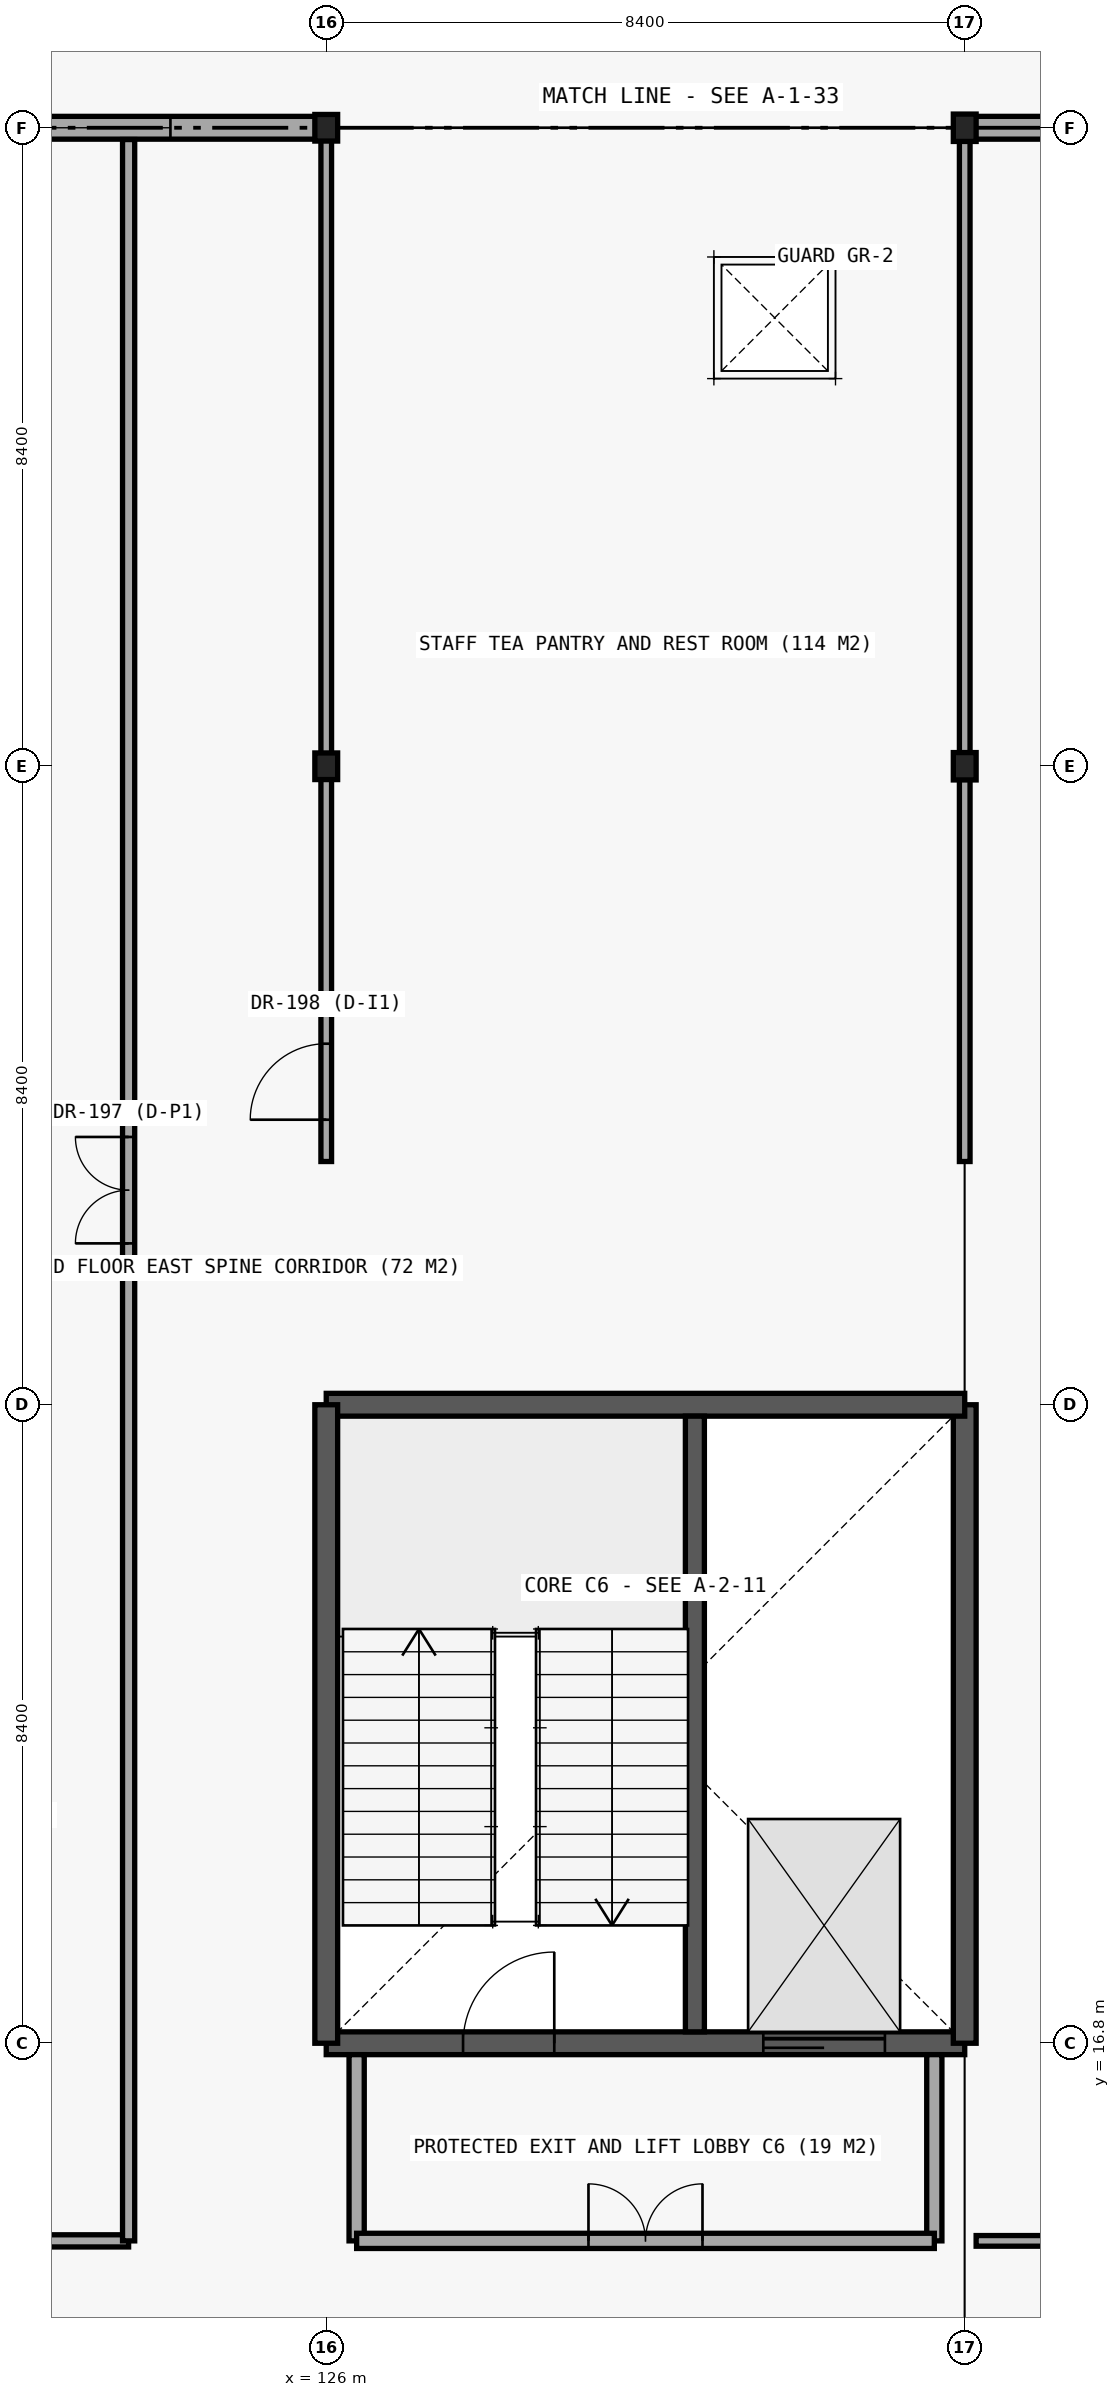
"""IFC4 building model, lengths in metres.
Left out: names, types, materials, properties, quantities, classifications, styles, units other than length and angle.
Written with IfcOpenShell. Run it as: python <this file> out.ifc"""

import sys

from ifc_helpers import new_model, si_unit, direction, frame, frame_2d, origin, origin_2d, place, context, subcontext, project, spatial, rectangle, i_section, extrude, element, fill, save


model = new_model("IFC4")
c1 = context("Model", 3, precision=1e-05, world=origin(), true_north=direction((0.0, 1.0)))
c2 = subcontext(c1, "Body", "Model", "MODEL_VIEW")
j1 = project(units=[si_unit("LENGTHUNIT", "METRE"), si_unit("PLANEANGLEUNIT", "RADIAN")], contexts=[c1])
p1 = place(None, origin())
s1 = spatial("IfcSite", under=j1, at=p1, CompositionType="ELEMENT")
p2 = place(p1, origin())
s2 = spatial("IfcBuilding", under=s1, at=p2, CompositionType="ELEMENT")
p3 = place(p2, frame((0.0, 0.0, 9.0)))
s3 = spatial("IfcBuildingStorey", under=s2, at=p3, CompositionType="ELEMENT", Elevation=9.0)
p4 = place(p3, frame((126.0, 16.8, 0.0), z_axis=(0.0, 0.0, 1.0), x_axis=(1.0, 0.0, 0.0)))
e1 = element("IfcWall", 1, at=p4, inside=s3, PredefinedType="SHEAR", context=c2, shape_type="SweptSolid", body=[
    extrude(rectangle(XDim=8.4, YDim=0.3, at=frame_2d((4.2, 0.0))), origin(), (0.0, 0.0, 1.0), 4.2),
])
p5 = place(p4, frame((1.8, 0.0, 0.0)))
e2 = element("IfcOpeningElement", 2, at=p5, cuts=e1, PredefinedType="OPENING", context=c2, shape_type="SweptSolid", body=[
    extrude(rectangle(XDim=1.2, YDim=2.2, at=frame_2d((0.6, 1.1))), frame((0.0, 0.16, 0.0), z_axis=(0.0, -1.0, 0.0), x_axis=(1.0, 0.0, 0.0)), (0.0, 0.0, 1.0), 0.32),
])
p6 = place(p4, frame((5.75, 0.0, 0.0)))
e3 = element("IfcOpeningElement", 3, at=p6, cuts=e1, PredefinedType="OPENING", context=c2, shape_type="SweptSolid", body=[
    extrude(rectangle(XDim=1.6, YDim=2.4, at=frame_2d((0.8, 1.2))), frame((0.0, 0.16, 0.0), z_axis=(0.0, -1.0, 0.0), x_axis=(1.0, 0.0, 0.0)), (0.0, 0.0, 1.0), 0.32),
])
for number, where, z_axis, x_axis in (
    (4, (134.4, 16.8, 0.0), (0.0, 0.0, 1.0), (0.0, 1.0, 0.0)),
    (5, (134.4, 25.2, 0.0), (0.0, 0.0, 1.0), (-1.0, 0.0, 0.0)),
    (6, (126.0, 25.2, 0.0), (0.0, 0.0, 1.0), (0.0, -1.0, 0.0)),
):
    element("IfcWall", number, at=place(p3, frame(where, z_axis=z_axis, x_axis=x_axis)), inside=s3, PredefinedType="SHEAR", context=c2, shape_type="SweptSolid", body=[
        extrude(rectangle(XDim=8.4, YDim=0.3, at=frame_2d((4.2, 0.0))), origin(), (0.0, 0.0, 1.0), 4.2),
    ])
p7 = place(p3, frame((130.85, 16.95, 0.0), z_axis=(0.0, 0.0, 1.0), x_axis=(0.0, 1.0, 0.0)))
e7 = element("IfcWall", 7, at=p7, inside=s3, PredefinedType="SHEAR", context=c2, shape_type="SweptSolid", body=[
    extrude(rectangle(XDim=8.1, YDim=0.25, at=frame_2d((4.05, 0.0))), origin(), (0.0, 0.0, 1.0), 4.2),
])
p8 = place(p3, frame((126.0, 33.6, 0.0), z_axis=(0.0, 0.0, 1.0), x_axis=(1.0, 0.0, 0.0)))
e8 = element("IfcColumn", 8, at=p8, inside=s3, PredefinedType="COLUMN", context=c2, shape_type="SweptSolid", body=[
    extrude(i_section(OverallWidth=0.3, OverallDepth=0.35, WebThickness=0.01, FlangeThickness=0.018, FilletRadius=0.027, at=origin_2d()), origin(), (0.0, 0.0, 1.0), 3.945),
])
p9 = place(p3, frame((126.0, 42.0, 0.0), z_axis=(0.0, 0.0, 1.0), x_axis=(1.0, 0.0, 0.0)))
e9 = element("IfcColumn", 9, at=p9, inside=s3, PredefinedType="COLUMN", context=c2, shape_type="SweptSolid", body=[
    extrude(i_section(OverallWidth=0.3, OverallDepth=0.35, WebThickness=0.01, FlangeThickness=0.018, FilletRadius=0.027, at=origin_2d()), origin(), (0.0, 0.0, 1.0), 4.03),
])
p10 = place(p3, frame((134.4, 33.6, 0.0), z_axis=(0.0, 0.0, 1.0), x_axis=(1.0, 0.0, 0.0)))
e10 = element("IfcColumn", 10, at=p10, inside=s3, PredefinedType="COLUMN", context=c2, shape_type="SweptSolid", body=[
    extrude(i_section(OverallWidth=0.3, OverallDepth=0.36, WebThickness=0.012, FlangeThickness=0.022, FilletRadius=0.027, at=origin_2d()), origin(), (0.0, 0.0, 1.0), 3.945),
])
p11 = place(p3, frame((134.4, 42.0, 0.0), z_axis=(0.0, 0.0, 1.0), x_axis=(1.0, 0.0, 0.0)))
e11 = element("IfcColumn", 11, at=p11, inside=s3, PredefinedType="COLUMN", context=c2, shape_type="SweptSolid", body=[
    extrude(i_section(OverallWidth=0.3, OverallDepth=0.36, WebThickness=0.012, FlangeThickness=0.022, FilletRadius=0.027, at=origin_2d()), origin(), (0.0, 0.0, 1.0), 4.03),
])
p12 = place(p3, frame((126.0, 42.0, 0.0), z_axis=(0.0, 0.0, 1.0), x_axis=(-1.0, 0.0, 0.0)))
e12 = element("IfcWall", 12, at=p12, inside=s3, PredefinedType="STANDARD", context=c2, shape_type="SweptSolid", body=[
    extrude(rectangle(XDim=8.4, YDim=0.3, at=frame_2d((4.2, 0.0))), origin(), (0.0, 0.0, 1.0), 3.58),
])
p13 = place(p12, frame((2.05, 0.0, 2.0)))
e13 = element("IfcOpeningElement", 13, at=p13, cuts=e12, PredefinedType="OPENING", context=c2, shape_type="SweptSolid", body=[
    extrude(rectangle(XDim=2.8, YDim=1.2, at=frame_2d((1.4, 0.6))), frame((0.0, 0.16, 0.0), z_axis=(0.0, -1.0, 0.0), x_axis=(1.0, 0.0, 0.0)), (0.0, 0.0, 1.0), 0.32),
])
p14 = place(p12, frame((5.0, 0.0, 2.05)))
e14 = element("IfcOpeningElement", 14, at=p14, cuts=e12, PredefinedType="OPENING", context=c2, shape_type="SweptSolid", body=[
    extrude(rectangle(XDim=2.2, YDim=1.1, at=frame_2d((1.1, 0.55))), frame((0.0, 0.16, 0.0), z_axis=(0.0, -1.0, 0.0), x_axis=(1.0, 0.0, 0.0)), (0.0, 0.0, 1.0), 0.32),
])
p15 = place(p3, frame((142.8, 42.0, 0.0), z_axis=(0.0, 0.0, 1.0), x_axis=(-1.0, 0.0, 0.0)))
e15 = element("IfcWall", 15, at=p15, inside=s3, PredefinedType="STANDARD", context=c2, shape_type="SweptSolid", body=[
    extrude(rectangle(XDim=8.4, YDim=0.3, at=frame_2d((4.2, 0.0))), origin(), (0.0, 0.0, 1.0), 3.58),
])
p16 = place(p15, frame((1.8, 0.0, 2.0)))
e16 = element("IfcOpeningElement", 16, at=p16, cuts=e15, PredefinedType="OPENING", context=c2, shape_type="SweptSolid", body=[
    extrude(rectangle(XDim=2.8, YDim=1.2, at=frame_2d((1.4, 0.6))), frame((0.0, 0.16, 0.0), z_axis=(0.0, -1.0, 0.0), x_axis=(1.0, 0.0, 0.0)), (0.0, 0.0, 1.0), 0.32),
])
p17 = place(p15, frame((5.0, 0.0, 2.05)))
e17 = element("IfcOpeningElement", 17, at=p17, cuts=e15, PredefinedType="OPENING", context=c2, shape_type="SweptSolid", body=[
    extrude(rectangle(XDim=2.2, YDim=1.1, at=frame_2d((1.1, 0.55))), frame((0.0, 0.16, 0.0), z_axis=(0.0, -1.0, 0.0), x_axis=(1.0, 0.0, 0.0)), (0.0, 0.0, 1.0), 0.32),
])
for number, where, z_axis, x_axis in (
    (18, (126.4, 14.2, 0.0), (0.0, 0.0, 1.0), (0.0, 1.0, 0.0)),
    (19, (134.0, 14.2, 0.0), (0.0, 0.0, 1.0), (0.0, 1.0, 0.0)),
):
    element("IfcWall", number, at=place(p3, frame(where, z_axis=z_axis, x_axis=x_axis)), inside=s3, PredefinedType="PARTITIONING", context=c2, shape_type="SweptSolid", body=[
        extrude(rectangle(XDim=2.45, YDim=0.2, at=frame_2d((1.225, 0.0))), origin(), (0.0, 0.0, 1.0), 3.52),
    ])
p18 = place(p3, frame((126.4, 14.2, 0.0), z_axis=(0.0, 0.0, 1.0), x_axis=(1.0, 0.0, 0.0)))
e20 = element("IfcWall", 20, at=p18, inside=s3, PredefinedType="PARTITIONING", context=c2, shape_type="SweptSolid", body=[
    extrude(rectangle(XDim=7.6, YDim=0.2, at=frame_2d((3.8, 0.0))), origin(), (0.0, 0.0, 1.0), 3.52),
])
p19 = place(p18, frame((3.05, 0.0, 0.0)))
e21 = element("IfcOpeningElement", 21, at=p19, cuts=e20, PredefinedType="OPENING", context=c2, shape_type="SweptSolid", body=[
    extrude(rectangle(XDim=1.5, YDim=2.2, at=frame_2d((0.75, 1.1))), frame((0.0, 0.11, 0.0), z_axis=(0.0, -1.0, 0.0), x_axis=(1.0, 0.0, 0.0)), (0.0, 0.0, 1.0), 0.22),
])
p20 = place(p3, frame((109.2, 14.2, 0.0), z_axis=(0.0, 0.0, 1.0), x_axis=(1.0, 0.0, 0.0)))
e22 = element("IfcWall", 22, at=p20, inside=s3, PredefinedType="PARTITIONING", context=c2, shape_type="SweptSolid", body=[
    extrude(rectangle(XDim=14.2, YDim=0.16, at=frame_2d((7.1, 0.0))), origin(), (0.0, 0.0, 1.0), 3.5),
])
p21 = place(p3, frame((134.55, 14.2, 0.0), z_axis=(0.0, 0.0, 1.0), x_axis=(1.0, 0.0, 0.0)))
e23 = element("IfcWall", 23, at=p21, inside=s3, PredefinedType="PARTITIONING", context=c2, shape_type="SweptSolid", body=[
    extrude(rectangle(XDim=7.85, YDim=0.14, at=frame_2d((3.925, 0.0))), origin(), (0.0, 0.0, 1.0), 3.5),
])
p22 = place(p3, frame((123.4, 14.2, 0.0), z_axis=(0.0, 0.0, 1.0), x_axis=(0.0, 1.0, 0.0)))
e24 = element("IfcWall", 24, at=p22, inside=s3, PredefinedType="PARTITIONING", context=c2, shape_type="SweptSolid", body=[
    extrude(rectangle(XDim=27.645, YDim=0.16, at=frame_2d((13.823, 0.0))), origin(), (0.0, 0.0, 1.0), 3.5),
])
p23 = place(p22, frame((13.123, 0.0, 0.0)))
e25 = element("IfcOpeningElement", 25, at=p23, cuts=e24, PredefinedType="OPENING", context=c2, shape_type="SweptSolid", body=[
    extrude(rectangle(XDim=1.4, YDim=2.25, at=frame_2d((0.7, 1.125))), frame((0.0, 0.09, 0.0), z_axis=(0.0, -1.0, 0.0), x_axis=(1.0, 0.0, 0.0)), (0.0, 0.0, 1.0), 0.18),
])
p24 = place(p3, frame((126.0, 28.4, 0.0), z_axis=(0.0, 0.0, 1.0), x_axis=(0.0, 1.0, 0.0)))
e26 = element("IfcWall", 26, at=p24, inside=s3, PredefinedType="PARTITIONING", context=c2, shape_type="SweptSolid", body=[
    extrude(rectangle(XDim=13.445, YDim=0.14, at=frame_2d((6.723, 0.0))), origin(), (0.0, 0.0, 1.0), 3.5),
])
p25 = place(p24, frame((0.55, 0.0, 0.0)))
e27 = element("IfcOpeningElement", 27, at=p25, cuts=e26, PredefinedType="OPENING", context=c2, shape_type="SweptSolid", body=[
    extrude(rectangle(XDim=1.0, YDim=2.15, at=frame_2d((0.5, 1.075))), frame((0.0, 0.08, 0.0), z_axis=(0.0, -1.0, 0.0), x_axis=(1.0, 0.0, 0.0)), (0.0, 0.0, 1.0), 0.16),
])
p26 = place(p3, frame((134.4, 28.4, 0.0), z_axis=(0.0, 0.0, 1.0), x_axis=(0.0, 1.0, 0.0)))
e28 = element("IfcWall", 28, at=p26, inside=s3, PredefinedType="PARTITIONING", context=c2, shape_type="SweptSolid", body=[
    extrude(rectangle(XDim=13.445, YDim=0.14, at=frame_2d((6.723, 0.0))), origin(), (0.0, 0.0, 1.0), 3.5),
])
p27 = place(p13, origin())
e29 = element("IfcWindow", 29, at=p27, inside=s3, PartitioningType="SINGLE_PANEL", PredefinedType="WINDOW", context=c2, shape_type="SweptSolid", body=[
    extrude(rectangle(XDim=2.8, YDim=1.2, at=frame_2d((1.4, 0.6))), frame((0.0, 0.03, 0.0), z_axis=(0.0, -1.0, 0.0), x_axis=(1.0, 0.0, 0.0)), (0.0, 0.0, 1.0), 0.06),
])
fill(e13, e29)
p28 = place(p5, origin())
e30 = element("IfcDoor", 30, at=p28, inside=s3, OperationType="SINGLE_SWING_RIGHT", PredefinedType="DOOR", context=c2, shape_type="SweptSolid", body=[
    extrude(rectangle(XDim=1.2, YDim=2.2, at=frame_2d((0.6, 1.1))), frame((0.0, 0.025, 0.0), z_axis=(0.0, -1.0, 0.0), x_axis=(1.0, 0.0, 0.0)), (0.0, 0.0, 1.0), 0.05),
])
fill(e2, e30)
p29 = place(p6, origin())
e31 = element("IfcDoor", 31, at=p29, inside=s3, OperationType="SLIDING_TO_LEFT", PredefinedType="DOOR", context=c2, shape_type="SweptSolid", body=[
    extrude(rectangle(XDim=1.6, YDim=2.4, at=frame_2d((0.8, 1.2))), frame((0.0, 0.025, 0.0), z_axis=(0.0, -1.0, 0.0), x_axis=(1.0, 0.0, 0.0)), (0.0, 0.0, 1.0), 0.05),
])
fill(e3, e31)
p30 = place(p19, origin())
e32 = element("IfcDoor", 32, at=p30, inside=s3, OperationType="DOUBLE_DOOR_SINGLE_SWING", PredefinedType="DOOR", context=c2, shape_type="SweptSolid", body=[
    extrude(rectangle(XDim=1.5, YDim=2.2, at=frame_2d((0.75, 1.1))), frame((0.0, 0.025, 0.0), z_axis=(0.0, -1.0, 0.0), x_axis=(1.0, 0.0, 0.0)), (0.0, 0.0, 1.0), 0.05),
])
fill(e21, e32)
p31 = place(p23, origin())
e33 = element("IfcDoor", 33, at=p31, inside=s3, OperationType="DOUBLE_DOOR_SINGLE_SWING", PredefinedType="DOOR", context=c2, shape_type="SweptSolid", body=[
    extrude(rectangle(XDim=1.4, YDim=2.25, at=frame_2d((0.7, 1.125))), frame((0.0, 0.025, 0.0), z_axis=(0.0, -1.0, 0.0), x_axis=(1.0, 0.0, 0.0)), (0.0, 0.0, 1.0), 0.05),
])
fill(e25, e33)
p32 = place(p25, origin())
e34 = element("IfcDoor", 34, at=p32, inside=s3, OperationType="SINGLE_SWING_LEFT", PredefinedType="DOOR", context=c2, shape_type="SweptSolid", body=[
    extrude(rectangle(XDim=1.0, YDim=2.15, at=frame_2d((0.5, 1.075))), frame((0.0, 0.025, 0.0), z_axis=(0.0, -1.0, 0.0), x_axis=(1.0, 0.0, 0.0)), (0.0, 0.0, 1.0), 0.05),
])
fill(e27, e34)
save(model, sys.argv[1])
